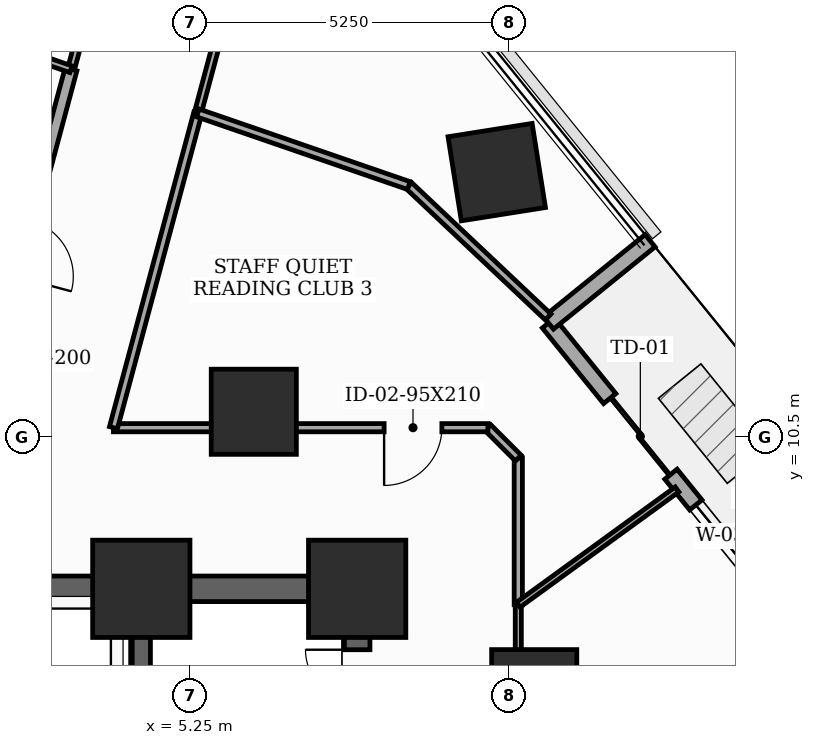
"""IFC4 building model, lengths in metres.
Left out: names, types, materials, properties, quantities, classifications, styles, units other than length and angle.
Written with IfcOpenShell. Run it as: python <this file> out.ifc"""

import sys

from ifc_helpers import new_model, si_unit, direction, frame, frame_2d, origin, origin_2d, place, context, subcontext, project, spatial, rectangle, extrude, element, fill, save


model = new_model("IFC4")
c1 = context("Model", 3, precision=1e-05, world=origin(), true_north=direction((0.0, 1.0)))
c2 = subcontext(c1, "Body", "Model", "MODEL_VIEW")
j1 = project(units=[si_unit("LENGTHUNIT", "METRE"), si_unit("PLANEANGLEUNIT", "RADIAN")], contexts=[c1])
p1 = place(None, origin())
s1 = spatial("IfcSite", under=j1, at=p1, CompositionType="ELEMENT")
p2 = place(p1, origin())
s2 = spatial("IfcBuilding", under=s1, at=p2, CompositionType="ELEMENT")
p3 = place(p2, frame((0.0, 0.0, 63.0)))
s3 = spatial("IfcBuildingStorey", under=s2, at=p3, CompositionType="ELEMENT", Elevation=63.0)
for number, where, z_axis, x_axis in (
    (1, (8.0, 8.0, 0.0), (0.0, 0.0, 1.0), (1.0, 0.0, 0.0)),
    (2, (4.45, 8.0, 0.0), (0.0, 0.0, 1.0), (1.0, 0.0, 0.0)),
):
    element("IfcColumn", number, at=place(p3, frame(where, z_axis=z_axis, x_axis=x_axis)), inside=s3, PredefinedType="COLUMN", context=c2, shape_type="SweptSolid", body=[
        extrude(rectangle(XDim=1.6, YDim=1.6, at=origin_2d()), origin(), (0.0, 0.0, 1.0), 3.7),
    ])
for number, where, z_axis, x_axis in (
    (3, (10.912, 6.3, 0.0), (0.0, 0.0, 1.0), (1.0, 0.0, 0.0)),
    (4, (6.3, 10.912, 0.0), (0.0, 0.0, 1.0), (1.0, 0.0, 0.0)),
    (5, (10.295, 14.853, 0.0), (0.0, 0.0, 1.0), (0.988, 0.156, 0.0)),
):
    element("IfcColumn", number, at=place(p3, frame(where, z_axis=z_axis, x_axis=x_axis)), inside=s3, PredefinedType="COLUMN", context=c2, shape_type="SweptSolid", body=[
        extrude(rectangle(XDim=1.4, YDim=1.4, at=origin_2d()), origin(), (0.0, 0.0, 1.0), 3.7),
    ])
p4 = place(p3, frame((17.943, 3.979, 0.0), z_axis=(0.0, 0.0, 1.0), x_axis=(-0.629312673468, 0.777152210968, 0.0)))
e6 = element("IfcWall", 6, at=p4, inside=s3, PredefinedType="SOLIDWALL", context=c2, shape_type="SweptSolid", body=[
    extrude(rectangle(XDim=10.8, YDim=0.26, at=frame_2d((5.4, 0.0))), origin(), (0.0, 0.0, 1.0), 3.5),
])
p5 = place(p4, frame((7.6, 0.0, 0.0)))
e7 = element("IfcOpeningElement", 7, at=p5, cuts=e6, PredefinedType="OPENING", context=c2, shape_type="SweptSolid", body=[
    extrude(rectangle(XDim=1.6, YDim=2.08, at=frame_2d((0.8, 1.04))), frame((0.0, 0.14, 0.0), z_axis=(0.0, -1.0, 0.0), x_axis=(1.0, 0.0, 0.0)), (0.0, 0.0, 1.0), 0.28),
])
p6 = place(p4, frame((5.65, 0.0, 0.85)))
e8 = element("IfcOpeningElement", 8, at=p6, cuts=e6, PredefinedType="OPENING", context=c2, shape_type="SweptSolid", body=[
    extrude(rectangle(XDim=1.3, YDim=1.25, at=frame_2d((0.65, 0.625))), frame((0.0, 0.14, 0.0), z_axis=(0.0, -1.0, 0.0), x_axis=(1.0, 0.0, 0.0)), (0.0, 0.0, 1.0), 0.28),
])
p7 = place(p3, frame((11.147, 12.372, 0.0), z_axis=(0.0, 0.0, 1.0), x_axis=(0.77715495389, 0.629309286157, 0.0)))
e9 = element("IfcWall", 9, at=p7, inside=s3, PredefinedType="SOLIDWALL", context=c2, shape_type="SweptSolid", body=[
    extrude(rectangle(XDim=2.15, YDim=0.26, at=frame_2d((1.075, 0.0))), origin(), (0.0, 0.0, 1.0), 3.5),
])
p8 = place(p3, frame((8.0, -8.0, 0.0), z_axis=(0.0, 0.0, 1.0), x_axis=(0.0, 1.0, 0.0)))
e10 = element("IfcWall", 10, at=p8, inside=s3, PredefinedType="SHEAR", context=c2, shape_type="SweptSolid", body=[
    extrude(rectangle(XDim=16.0, YDim=0.42, at=frame_2d((8.0, 0.0))), origin(), (0.0, 0.0, 1.0), 3.5),
])
p9 = place(p8, frame((9.6, 0.0, 0.0)))
e11 = element("IfcOpeningElement", 11, at=p9, cuts=e10, PredefinedType="OPENING", context=c2, shape_type="SweptSolid", body=[
    extrude(rectangle(XDim=1.05, YDim=2.15, at=frame_2d((0.525, 1.075))), frame((0.0, 0.22, 0.0), z_axis=(0.0, -1.0, 0.0), x_axis=(1.0, 0.0, 0.0)), (0.0, 0.0, 1.0), 0.44),
])
p10 = place(p8, frame((14.148, 0.0, 0.0)))
e12 = element("IfcOpeningElement", 12, at=p10, cuts=e10, PredefinedType="OPENING", context=c2, shape_type="SweptSolid", body=[
    extrude(rectangle(XDim=0.85, YDim=2.02, at=frame_2d((0.425, 1.01))), frame((0.0, 0.22, 0.0), z_axis=(0.0, -1.0, 0.0), x_axis=(1.0, 0.0, 0.0)), (0.0, 0.0, 1.0), 0.44),
])
p11 = place(p3, frame((-8.0, 8.0, 0.0), z_axis=(0.0, 0.0, 1.0), x_axis=(1.0, 0.0, 0.0)))
e13 = element("IfcWall", 13, at=p11, inside=s3, PredefinedType="SHEAR", context=c2, shape_type="SweptSolid", body=[
    extrude(rectangle(XDim=16.0, YDim=0.42, at=frame_2d((8.0, 0.0))), origin(), (0.0, 0.0, 1.0), 3.5),
])
p12 = place(p11, frame((7.1, 0.0, 0.0)))
e14 = element("IfcOpeningElement", 14, at=p12, cuts=e13, PredefinedType="OPENING", context=c2, shape_type="SweptSolid", body=[
    extrude(rectangle(XDim=1.8, YDim=2.15, at=frame_2d((0.9, 1.075))), frame((0.0, 0.22, 0.0), z_axis=(0.0, -1.0, 0.0), x_axis=(1.0, 0.0, 0.0)), (0.0, 0.0, 1.0), 0.44),
])
p13 = place(p3, frame((4.45, -7.79, 0.0), z_axis=(0.0, 0.0, 1.0), x_axis=(0.0, 1.0, 0.0)))
e15 = element("IfcWall", 15, at=p13, inside=s3, PredefinedType="SHEAR", context=c2, shape_type="SweptSolid", body=[
    extrude(rectangle(XDim=15.58, YDim=0.3, at=frame_2d((7.79, 0.0))), origin(), (0.0, 0.0, 1.0), 3.5),
])
p14 = place(p3, frame((10.65, -1.715, 0.0), z_axis=(0.0, 0.0, 1.0), x_axis=(0.0, 1.0, 0.0)))
e16 = element("IfcWall", 16, at=p14, inside=s3, PredefinedType="MOVABLE", context=c2, shape_type="SweptSolid", body=[
    extrude(rectangle(XDim=9.453, YDim=0.1, at=frame_2d((4.727, 0.0))), origin(), (0.0, 0.0, 1.0), 2.785),
])
p15 = place(p3, frame((10.65, 7.738, 0.0), z_axis=(0.0, 0.0, 1.0), x_axis=(0.0, 1.0, 0.0)))
e17 = element("IfcWall", 17, at=p15, inside=s3, PredefinedType="PARTITIONING", context=c2, shape_type="SweptSolid", body=[
    extrude(rectangle(XDim=2.412, YDim=0.135, at=frame_2d((1.206, 0.0))), origin(), (0.0, 0.0, 1.0), 3.5),
])
p16 = place(p3, frame((10.65, 10.15, 0.0), z_axis=(0.0, 0.0, 1.0), x_axis=(-0.707106781187, 0.707106781187, 0.0)))
e18 = element("IfcWall", 18, at=p16, inside=s3, PredefinedType="PARTITIONING", context=c2, shape_type="SweptSolid", body=[
    extrude(rectangle(XDim=0.707, YDim=0.135, at=frame_2d((0.354, 0.0))), origin(), (0.0, 0.0, 1.0), 3.5),
])
p17 = place(p3, frame((10.15, 10.65, 0.0), z_axis=(0.0, 0.0, 1.0), x_axis=(-1.0, 0.0, 0.0)))
e19 = element("IfcWall", 19, at=p17, inside=s3, PredefinedType="PARTITIONING", context=c2, shape_type="SweptSolid", body=[
    extrude(rectangle(XDim=6.158, YDim=0.135, at=frame_2d((3.079, 0.0))), origin(), (0.0, 0.0, 1.0), 2.785),
])
p18 = place(p17, frame((0.757, 0.0, 0.0)))
e20 = element("IfcOpeningElement", 20, at=p18, cuts=e19, PredefinedType="OPENING", context=c2, shape_type="SweptSolid", body=[
    extrude(rectangle(XDim=0.95, YDim=2.1, at=frame_2d((0.475, 1.05))), frame((0.0, 0.077, 0.0), z_axis=(0.0, -1.0, 0.0), x_axis=(1.0, 0.0, 0.0)), (0.0, 0.0, 1.0), 0.155),
])
p19 = place(p3, frame((3.992, 10.65, 0.0), z_axis=(0.0, 0.0, 1.0), x_axis=(0.258952377387, 0.965890090148, 0.0)))
e21 = element("IfcWall", 21, at=p19, inside=s3, PredefinedType="PARTITIONING", context=c2, shape_type="SweptSolid", body=[
    extrude(rectangle(XDim=5.36, YDim=0.135, at=frame_2d((2.68, 0.0))), origin(), (0.0, 0.0, 1.0), 2.785),
])
p20 = place(p3, frame((5.38, 15.827, 0.0), z_axis=(0.0, 0.0, 1.0), x_axis=(0.258740236453, 0.965946939557, 0.0)))
e22 = element("IfcWall", 22, at=p20, inside=s3, PredefinedType="PARTITIONING", context=c2, shape_type="SweptSolid", body=[
    extrude(rectangle(XDim=3.92, YDim=0.115, at=frame_2d((1.96, 0.0))), origin(), (0.0, 0.0, 1.0), 2.935),
])
p21 = place(p20, frame((1.485, 0.0, 0.0)))
e23 = element("IfcOpeningElement", 23, at=p21, cuts=e22, PredefinedType="OPENING", context=c2, shape_type="SweptSolid", body=[
    extrude(rectangle(XDim=0.95, YDim=2.1, at=frame_2d((0.475, 1.05))), frame((0.0, 0.067, 0.0), z_axis=(0.0, -1.0, 0.0), x_axis=(1.0, 0.0, 0.0)), (0.0, 0.0, 1.0), 0.135),
])
p22 = place(p3, frame((4.269, 20.183, 0.0), z_axis=(0.0, 0.0, 1.0), x_axis=(-0.258880798168, -0.965909277489, 0.0)))
e24 = element("IfcWall", 24, at=p22, inside=s3, PredefinedType="PARTITIONING", context=c2, shape_type="SweptSolid", body=[
    extrude(rectangle(XDim=3.767, YDim=0.115, at=frame_2d((1.883, 0.0))), origin(), (0.0, 0.0, 1.0), 3.085),
])
p23 = place(p3, frame((3.294, 16.545, 0.0), z_axis=(0.0, 0.0, 1.0), x_axis=(-0.258710756328, -0.965954835673, 0.0)))
e25 = element("IfcWall", 25, at=p23, inside=s3, PredefinedType="SOLIDWALL", context=c2, shape_type="SweptSolid", body=[
    extrude(rectangle(XDim=6.103, YDim=0.2, at=frame_2d((3.051, 0.0))), origin(), (0.0, 0.0, 1.0), 2.785),
])
p24 = place(p23, frame((2.576, 0.0, 0.0)))
e26 = element("IfcOpeningElement", 26, at=p24, cuts=e25, PredefinedType="OPENING", context=c2, shape_type="SweptSolid", body=[
    extrude(rectangle(XDim=0.95, YDim=2.1, at=frame_2d((0.475, 1.05))), frame((0.0, 0.11, 0.0), z_axis=(0.0, -1.0, 0.0), x_axis=(1.0, 0.0, 0.0)), (0.0, 0.0, 1.0), 0.22),
])
p25 = place(p3, frame((13.26, 9.635, 0.0), z_axis=(0.0, 0.0, 1.0), x_axis=(-0.809050067095, -0.587739728906, 0.0)))
e27 = element("IfcWall", 27, at=p25, inside=s3, PredefinedType="MOVABLE", context=c2, shape_type="SweptSolid", body=[
    extrude(rectangle(XDim=3.227, YDim=0.1, at=frame_2d((1.613, 0.0))), origin(), (0.0, 0.0, 1.0), 3.085),
])
p26 = place(p3, frame((11.141, 12.47, 0.0), z_axis=(0.0, 0.0, 1.0), x_axis=(-0.727348392084, 0.686268399777, 0.0)))
e28 = element("IfcWall", 28, at=p26, inside=s3, PredefinedType="PARTITIONING", context=c2, shape_type="SweptSolid", body=[
    extrude(rectangle(XDim=3.15, YDim=0.135, at=frame_2d((1.575, 0.0))), origin(), (0.0, 0.0, 1.0), 2.785),
])
p27 = place(p3, frame((8.85, 14.632, 0.0), z_axis=(0.0, 0.0, 1.0), x_axis=(-0.945524159467, 0.325551937275, 0.0)))
e29 = element("IfcWall", 29, at=p27, inside=s3, PredefinedType="PARTITIONING", context=c2, shape_type="SweptSolid", body=[
    extrude(rectangle(XDim=3.67, YDim=0.135, at=frame_2d((1.835, 0.0))), origin(), (0.0, 0.0, 1.0), 3.085),
])
p28 = place(p3, frame((2.035, 16.979, 0.0), z_axis=(0.0, 0.0, 1.0), x_axis=(0.945388565789, -0.325945485742, 0.0)))
e30 = element("IfcWall", 30, at=p28, inside=s3, PredefinedType="PARTITIONING", context=c2, shape_type="SweptSolid", body=[
    extrude(rectangle(XDim=1.332, YDim=0.115, at=frame_2d((0.666, 0.0))), origin(), (0.0, 0.0, 1.0), 3.5),
])
p29 = place(p5, frame((1.6, 0.0, 0.0), z_axis=(0.0, 0.0, 1.0), x_axis=(-1.0, 0.0, 0.0)))
e31 = element("IfcDoor", 31, at=p29, inside=s3, OperationType="DOUBLE_DOOR_SLIDING", PredefinedType="DOOR", context=c2, shape_type="SweptSolid", body=[
    extrude(rectangle(XDim=1.6, YDim=2.08, at=frame_2d((0.8, 1.04))), frame((0.0, 0.025, 0.0), z_axis=(0.0, -1.0, 0.0), x_axis=(1.0, 0.0, 0.0)), (0.0, 0.0, 1.0), 0.05),
])
fill(e7, e31)
p30 = place(p6, origin())
e32 = element("IfcWindow", 32, at=p30, inside=s3, PartitioningType="SINGLE_PANEL", PredefinedType="WINDOW", context=c2, shape_type="SweptSolid", body=[
    extrude(rectangle(XDim=1.3, YDim=1.25, at=frame_2d((0.65, 0.625))), frame((0.0, 0.03, 0.0), z_axis=(0.0, -1.0, 0.0), x_axis=(1.0, 0.0, 0.0)), (0.0, 0.0, 1.0), 0.06),
])
fill(e8, e32)
p31 = place(p10, origin())
e33 = element("IfcDoor", 33, at=p31, inside=s3, OperationType="SINGLE_SWING_RIGHT", PredefinedType="TRAPDOOR", context=c2, shape_type="SweptSolid", body=[
    extrude(rectangle(XDim=0.85, YDim=2.02, at=frame_2d((0.425, 1.01))), frame((0.0, 0.025, 0.0), z_axis=(0.0, -1.0, 0.0), x_axis=(1.0, 0.0, 0.0)), (0.0, 0.0, 1.0), 0.05),
])
fill(e12, e33)
p32 = place(p18, origin())
e34 = element("IfcDoor", 34, at=p32, inside=s3, OperationType="SINGLE_SWING_RIGHT", PredefinedType="DOOR", context=c2, shape_type="SweptSolid", body=[
    extrude(rectangle(XDim=0.95, YDim=2.1, at=frame_2d((0.475, 1.05))), frame((0.0, 0.025, 0.0), z_axis=(0.0, -1.0, 0.0), x_axis=(1.0, 0.0, 0.0)), (0.0, 0.0, 1.0), 0.05),
])
fill(e20, e34)
save(model, sys.argv[1])
